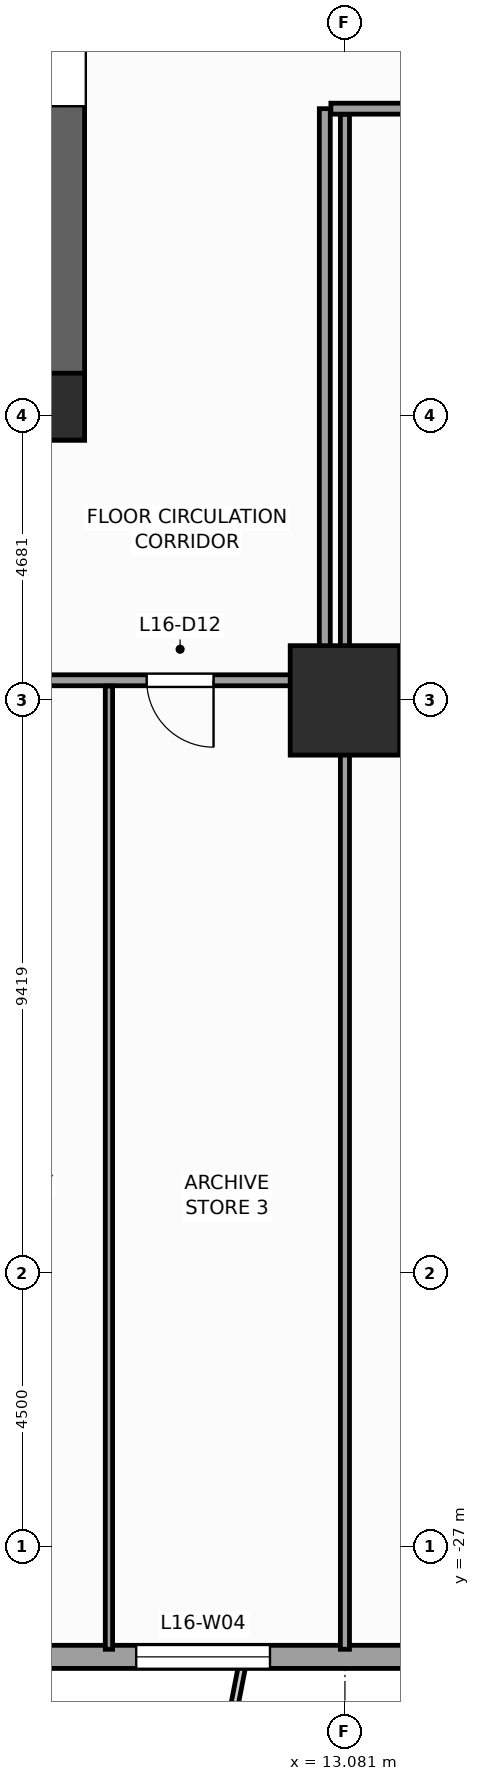
"""IFC4 building model, lengths in metres.
Left out: names, types, materials, properties, quantities, classifications, styles, units other than length and angle.
Written with IfcOpenShell. Run it as: python <this file> out.ifc"""

import sys

from ifc_helpers import new_model, si_unit, direction, frame, frame_2d, origin, origin_2d, place, context, subcontext, project, spatial, rectangle, extrude, source, transform, mapped, element, fill, save


model = new_model("IFC4")
c1 = context("Model", 3, precision=1e-05, world=origin(), true_north=direction((0.0, 1.0)))
c2 = subcontext(c1, "Body", "Model", "MODEL_VIEW")
j1 = project(units=[si_unit("LENGTHUNIT", "METRE"), si_unit("PLANEANGLEUNIT", "RADIAN")], contexts=[c1])
p1 = place(None, origin())
s1 = spatial("IfcSite", under=j1, at=p1, CompositionType="ELEMENT")
p2 = place(p1, origin())
s2 = spatial("IfcBuilding", under=s1, at=p2, CompositionType="ELEMENT")
p3 = place(p2, frame((0.0, 0.0, 70.0)))
s3 = spatial("IfcBuildingStorey", under=s2, at=p3, CompositionType="ELEMENT", Elevation=70.0)
p4 = place(p3, frame((-8.8, -8.4, 0.0), z_axis=(0.0, 0.0, 1.0), x_axis=(1.0, 0.0, 0.0)))
e1 = element("IfcWall", 1, at=p4, inside=s3, PredefinedType="SHEAR", context=c2, shape_type="SweptSolid", body=[
    extrude(rectangle(XDim=17.6, YDim=0.8, at=frame_2d((8.8, 0.0))), origin(), (0.0, 0.0, 1.0), 4.0),
])
p5 = place(p4, frame((8.15, 0.0, 0.0)))
e2 = element("IfcOpeningElement", 2, at=p5, cuts=e1, PredefinedType="OPENING", context=c2, shape_type="SweptSolid", body=[
    extrude(rectangle(XDim=1.3, YDim=2.2, at=frame_2d((0.65, 1.1))), frame((0.0, 0.41, 0.0), z_axis=(0.0, -1.0, 0.0), x_axis=(1.0, 0.0, 0.0)), (0.0, 0.0, 1.0), 0.82),
])
p6 = place(p3, frame((8.4, -8.0, 0.0), z_axis=(0.0, 0.0, 1.0), x_axis=(0.0, 1.0, 0.0)))
e3 = element("IfcWall", 3, at=p6, inside=s3, PredefinedType="SHEAR", context=c2, shape_type="SweptSolid", body=[
    extrude(rectangle(XDim=16.0, YDim=0.8, at=frame_2d((8.0, 0.0))), origin(), (0.0, 0.0, 1.0), 4.0),
])
p7 = place(p6, frame((4.69, 0.0, 0.0)))
e4 = element("IfcOpeningElement", 4, at=p7, cuts=e3, PredefinedType="OPENING", context=c2, shape_type="SweptSolid", body=[
    extrude(rectangle(XDim=1.3, YDim=2.2, at=frame_2d((0.65, 1.1))), frame((0.0, 0.41, 0.0), z_axis=(0.0, -1.0, 0.0), x_axis=(1.0, 0.0, 0.0)), (0.0, 0.0, 1.0), 0.82),
])
m1 = source(origin(), c2, "Body", "SweptSolid", [
    extrude(rectangle(XDim=1.1, YDim=1.1, at=origin_2d()), origin(), (0.0, 0.0, 1.0), 4.0),
])
p8 = place(p3, frame((8.25, -8.25, 0.0), z_axis=(0.0, 0.0, 1.0), x_axis=(1.0, 0.0, 0.0)))
e5 = element("IfcColumn", 5, at=p8, inside=s3, PredefinedType="PILASTER", context=c2, shape_type="MappedRepresentation", body=[
    mapped(m1, transform((0.0, 0.0, 0.0), scale=1.0)),
])
m2 = source(origin(), c2, "Body", "SweptSolid", [
    extrude(rectangle(XDim=1.8, YDim=1.8, at=origin_2d()), origin(), (0.0, 0.0, 1.0), 4.0),
])
p9 = place(p3, frame((13.081, -13.081, 0.0), z_axis=(0.0, 0.0, 1.0), x_axis=(1.0, 0.0, 0.0)))
e6 = element("IfcColumn", 6, at=p9, inside=s3, PredefinedType="COLUMN", context=c2, shape_type="MappedRepresentation", body=[
    mapped(m2, transform((0.0, 0.0, 0.0), scale=1.0)),
])
p10 = place(p3, frame((-25.69, -28.81, 0.0), z_axis=(0.0, 0.0, 1.0), x_axis=(1.0, 0.0, 0.0)))
e7 = element("IfcWall", 7, at=p10, inside=s3, PredefinedType="STANDARD", context=c2, shape_type="SweptSolid", body=[
    extrude(rectangle(XDim=51.38, YDim=0.38, at=frame_2d((25.69, 0.0))), origin(), (0.0, 0.0, 1.0), 3.12),
])
p11 = place(p10, frame((5.466, 0.0, 0.49)))
e8 = element("IfcOpeningElement", 8, at=p11, cuts=e7, PredefinedType="OPENING", context=c2, shape_type="SweptSolid", body=[
    extrude(rectangle(XDim=1.4, YDim=2.4, at=frame_2d((0.7, 1.2))), frame((0.0, 0.2, 0.0), z_axis=(0.0, -1.0, 0.0), x_axis=(1.0, 0.0, 0.0)), (0.0, 0.0, 1.0), 0.4),
])
p12 = place(p10, frame((13.8, 0.0, 0.49)))
e9 = element("IfcOpeningElement", 9, at=p12, cuts=e7, PredefinedType="OPENING", context=c2, shape_type="SweptSolid", body=[
    extrude(rectangle(XDim=2.2, YDim=2.4, at=frame_2d((1.1, 1.2))), frame((0.0, 0.2, 0.0), z_axis=(0.0, -1.0, 0.0), x_axis=(1.0, 0.0, 0.0)), (0.0, 0.0, 1.0), 0.4),
])
p13 = place(p10, frame((22.062, 0.0, 0.49)))
e10 = element("IfcOpeningElement", 10, at=p13, cuts=e7, PredefinedType="OPENING", context=c2, shape_type="SweptSolid", body=[
    extrude(rectangle(XDim=2.2, YDim=2.4, at=frame_2d((1.1, 1.2))), frame((0.0, 0.2, 0.0), z_axis=(0.0, -1.0, 0.0), x_axis=(1.0, 0.0, 0.0)), (0.0, 0.0, 1.0), 0.4),
])
p14 = place(p10, frame((35.338, 0.0, 0.49)))
e11 = element("IfcOpeningElement", 11, at=p14, cuts=e7, PredefinedType="OPENING", context=c2, shape_type="SweptSolid", body=[
    extrude(rectangle(XDim=2.2, YDim=2.4, at=frame_2d((1.1, 1.2))), frame((0.0, 0.2, 0.0), z_axis=(0.0, -1.0, 0.0), x_axis=(1.0, 0.0, 0.0)), (0.0, 0.0, 1.0), 0.4),
])
p15 = place(p10, frame((43.487, 0.0, 0.49)))
e12 = element("IfcOpeningElement", 12, at=p15, cuts=e7, PredefinedType="OPENING", context=c2, shape_type="SweptSolid", body=[
    extrude(rectangle(XDim=1.4, YDim=2.4, at=frame_2d((0.7, 1.2))), frame((0.0, 0.2, 0.0), z_axis=(0.0, -1.0, 0.0), x_axis=(1.0, 0.0, 0.0)), (0.0, 0.0, 1.0), 0.4),
])
p16 = place(p3, frame((3.35, -12.75, 0.0), z_axis=(0.0, 0.0, 1.0), x_axis=(1.0, 0.0, 0.0)))
e13 = element("IfcWall", 13, at=p16, inside=s3, PredefinedType="PARTITIONING", context=c2, shape_type="SweptSolid", body=[
    extrude(rectangle(XDim=9.4, YDim=0.18, at=frame_2d((4.7, 0.0))), origin(), (0.0, 0.0, 1.0), 3.72),
])
p17 = place(p16, frame((3.45, 0.0, 0.0)))
e14 = element("IfcOpeningElement", 14, at=p17, cuts=e13, PredefinedType="OPENING", context=c2, shape_type="SweptSolid", body=[
    extrude(rectangle(XDim=1.1, YDim=2.2, at=frame_2d((0.55, 1.1))), frame((0.0, 0.1, 0.0), z_axis=(0.0, -1.0, 0.0), x_axis=(1.0, 0.0, 0.0)), (0.0, 0.0, 1.0), 0.2),
])
p18 = place(p16, frame((6.47, 0.0, 0.0)))
e15 = element("IfcOpeningElement", 15, at=p18, cuts=e13, PredefinedType="OPENING", context=c2, shape_type="SweptSolid", body=[
    extrude(rectangle(XDim=1.1, YDim=2.2, at=frame_2d((0.55, 1.1))), frame((0.0, 0.1, 0.0), z_axis=(0.0, -1.0, 0.0), x_axis=(1.0, 0.0, 0.0)), (0.0, 0.0, 1.0), 0.2),
])
p19 = place(p3, frame((12.75, -12.75, 0.0), z_axis=(0.0, 0.0, 1.0), x_axis=(0.0, 1.0, 0.0)))
e16 = element("IfcWall", 16, at=p19, inside=s3, PredefinedType="PARTITIONING", context=c2, shape_type="SweptSolid", body=[
    extrude(rectangle(XDim=9.4, YDim=0.18, at=frame_2d((4.7, 0.0))), origin(), (0.0, 0.0, 1.0), 3.72),
])
p20 = place(p3, frame((12.85, -3.35, 0.0), z_axis=(0.0, 0.0, 1.0), x_axis=(1.0, 0.0, 0.0)))
e17 = element("IfcWall", 17, at=p20, inside=s3, PredefinedType="PARTITIONING", context=c2, shape_type="SweptSolid", body=[
    extrude(rectangle(XDim=15.835, YDim=0.18, at=frame_2d((7.917, 0.0))), origin(), (0.0, 0.0, 1.0), 3.72),
])
p21 = place(p20, frame((7.367, 0.0, 0.0)))
e18 = element("IfcOpeningElement", 18, at=p21, cuts=e17, PredefinedType="OPENING", context=c2, shape_type="SweptSolid", body=[
    extrude(rectangle(XDim=1.1, YDim=2.2, at=frame_2d((0.55, 1.1))), frame((0.0, 0.1, 0.0), z_axis=(0.0, -1.0, 0.0), x_axis=(1.0, 0.0, 0.0)), (0.0, 0.0, 1.0), 0.2),
])
p22 = place(p3, frame((9.2, -28.685, 0.0), z_axis=(0.0, 0.0, 1.0), x_axis=(0.0, 1.0, 0.0)))
e19 = element("IfcWall", 19, at=p22, inside=s3, PredefinedType="PARTITIONING", context=c2, shape_type="SweptSolid", body=[
    extrude(rectangle(XDim=15.84, YDim=0.12, at=frame_2d((7.92, 0.0))), origin(), (0.0, 0.0, 1.0), 3.72),
])
p23 = place(p3, frame((13.081, -28.685, 0.0), z_axis=(0.0, 0.0, 1.0), x_axis=(0.0, 1.0, 0.0)))
e20 = element("IfcWall", 20, at=p23, inside=s3, PredefinedType="PARTITIONING", context=c2, shape_type="SweptSolid", body=[
    extrude(rectangle(XDim=25.24, YDim=0.15, at=frame_2d((12.62, 0.0))), origin(), (0.0, 0.0, 1.0), 2.712),
])
m3 = source(origin(), c2, "Body", "SweptSolid", [
    extrude(rectangle(XDim=2.2, YDim=2.4, at=frame_2d((1.1, 1.2))), frame((0.0, 0.03, 0.0), z_axis=(0.0, -1.0, 0.0), x_axis=(1.0, 0.0, 0.0)), (0.0, 0.0, 1.0), 0.06),
])
p24 = place(p14, origin())
e21 = element("IfcWindow", 21, at=p24, inside=s3, PartitioningType="SINGLE_PANEL", PredefinedType="WINDOW", context=c2, shape_type="MappedRepresentation", body=[
    mapped(m3, transform((0.0, 0.0, 0.0), scale=1.0)),
])
fill(e11, e21)
m4 = source(origin(), c2, "Body", "SweptSolid", [
    extrude(rectangle(XDim=1.3, YDim=2.2, at=frame_2d((0.65, 1.1))), frame((0.0, 0.025, 0.0), z_axis=(0.0, -1.0, 0.0), x_axis=(1.0, 0.0, 0.0)), (0.0, 0.0, 1.0), 0.05),
])
p25 = place(p7, origin())
e22 = element("IfcDoor", 22, at=p25, inside=s3, OperationType="SINGLE_SWING_RIGHT", PredefinedType="DOOR", context=c2, shape_type="MappedRepresentation", body=[
    mapped(m4, transform((0.0, 0.0, 0.0), scale=1.0)),
])
fill(e4, e22)
m5 = source(origin(), c2, "Body", "SweptSolid", [
    extrude(rectangle(XDim=1.1, YDim=2.2, at=frame_2d((0.55, 1.1))), frame((0.0, 0.025, 0.0), z_axis=(0.0, -1.0, 0.0), x_axis=(1.0, 0.0, 0.0)), (0.0, 0.0, 1.0), 0.05),
])
p26 = place(p18, frame((1.1, 0.0, 0.0), z_axis=(0.0, 0.0, 1.0), x_axis=(-1.0, 0.0, 0.0)))
e23 = element("IfcDoor", 23, at=p26, inside=s3, OperationType="SINGLE_SWING_RIGHT", PredefinedType="DOOR", context=c2, shape_type="MappedRepresentation", body=[
    mapped(m5, transform((0.0, 0.0, 0.0), scale=1.0)),
])
fill(e15, e23)
save(model, sys.argv[1])
